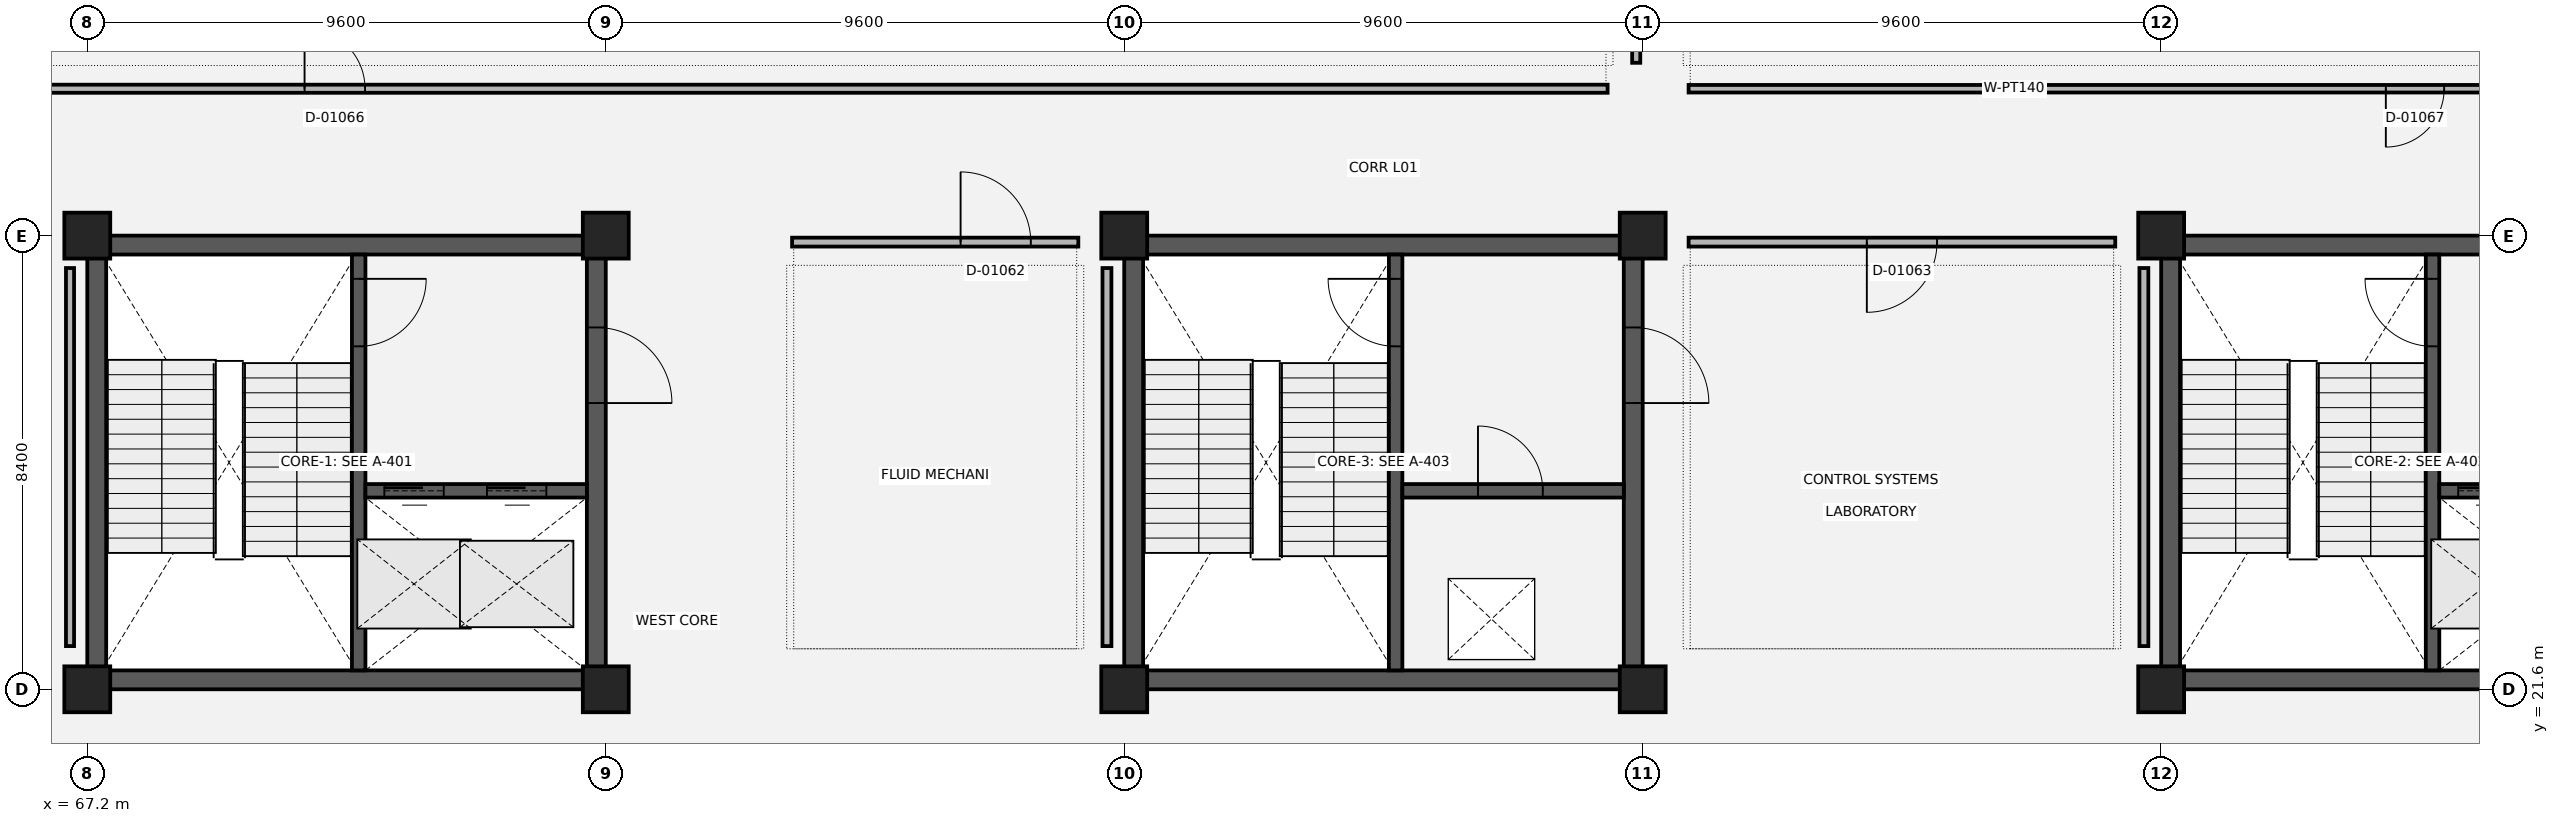
"""IFC4 building model, lengths in metres.
Left out: names, types, materials, properties, quantities, classifications, styles, units other than length and angle.
Written with IfcOpenShell. Run it as: python <this file> out.ifc"""

import sys

from ifc_helpers import new_model, si_unit, direction, frame, frame_2d, origin, origin_2d, place, context, subcontext, project, spatial, rectangle, extrude, element, fill, save


model = new_model("IFC4")
c1 = context("Model", 3, precision=1e-05, world=origin(), true_north=direction((0.0, 1.0)))
c2 = subcontext(c1, "Body", "Model", "MODEL_VIEW")
j1 = project(units=[si_unit("LENGTHUNIT", "METRE"), si_unit("PLANEANGLEUNIT", "RADIAN")], contexts=[c1])
p1 = place(None, origin())
s1 = spatial("IfcSite", under=j1, at=p1, CompositionType="ELEMENT")
p2 = place(p1, origin())
s2 = spatial("IfcBuilding", under=s1, at=p2, CompositionType="ELEMENT")
p3 = place(p2, frame((0.0, 0.0, 5.4)))
s3 = spatial("IfcBuildingStorey", under=s2, at=p3, CompositionType="ELEMENT", Elevation=5.4)
for number, where, z_axis, x_axis in (
    (1, (67.2, 21.6, 0.0), (0.0, 0.0, 1.0), (1.0, 0.0, 0.0)),
    (2, (67.2, 30.0, 0.0), (0.0, 0.0, 1.0), (1.0, 0.0, 0.0)),
    (3, (76.8, 21.6, 0.0), (0.0, 0.0, 1.0), (1.0, 0.0, 0.0)),
    (4, (76.8, 30.0, 0.0), (0.0, 0.0, 1.0), (1.0, 0.0, 0.0)),
    (5, (86.4, 21.6, 0.0), (0.0, 0.0, 1.0), (1.0, 0.0, 0.0)),
    (6, (86.4, 30.0, 0.0), (0.0, 0.0, 1.0), (1.0, 0.0, 0.0)),
    (7, (96.0, 21.6, 0.0), (0.0, 0.0, 1.0), (1.0, 0.0, 0.0)),
    (8, (96.0, 30.0, 0.0), (0.0, 0.0, 1.0), (1.0, 0.0, 0.0)),
    (9, (105.6, 21.6, 0.0), (0.0, 0.0, 1.0), (1.0, 0.0, 0.0)),
    (10, (105.6, 30.0, 0.0), (0.0, 0.0, 1.0), (1.0, 0.0, 0.0)),
):
    element("IfcColumn", number, at=place(p3, frame(where, z_axis=z_axis, x_axis=x_axis)), inside=s3, PredefinedType="COLUMN", context=c2, shape_type="SweptSolid", body=[
        extrude(rectangle(XDim=0.85, YDim=0.85, at=origin_2d()), origin(), (0.0, 0.0, 1.0), 4.8),
    ])
for number, where, z_axis, x_axis in (
    (11, (67.2, 29.825, 0.0), (0.0, 0.0, 1.0), (1.0, 0.0, 0.0)),
    (12, (67.2, 21.775, 0.0), (0.0, 0.0, 1.0), (1.0, 0.0, 0.0)),
):
    element("IfcWall", number, at=place(p3, frame(where, z_axis=z_axis, x_axis=x_axis)), inside=s3, PredefinedType="SHEAR", context=c2, shape_type="SweptSolid", body=[
        extrude(rectangle(XDim=9.6, YDim=0.35, at=frame_2d((4.8, 0.0))), origin(), (0.0, 0.0, 1.0), 4.48),
    ])
p4 = place(p3, frame((67.375, 21.6, 0.0), z_axis=(0.0, 0.0, 1.0), x_axis=(0.0, 1.0, 0.0)))
e13 = element("IfcWall", 13, at=p4, inside=s3, PredefinedType="SHEAR", context=c2, shape_type="SweptSolid", body=[
    extrude(rectangle(XDim=8.4, YDim=0.35, at=frame_2d((4.2, 0.0))), origin(), (0.0, 0.0, 1.0), 4.48),
])
p5 = place(p3, frame((76.625, 21.6, 0.0), z_axis=(0.0, 0.0, 1.0), x_axis=(0.0, 1.0, 0.0)))
e14 = element("IfcWall", 14, at=p5, inside=s3, PredefinedType="SHEAR", context=c2, shape_type="SweptSolid", body=[
    extrude(rectangle(XDim=8.4, YDim=0.35, at=frame_2d((4.2, 0.0))), origin(), (0.0, 0.0, 1.0), 4.48),
])
p6 = place(p5, frame((5.3, 0.0, 0.0)))
e15 = element("IfcOpeningElement", 15, at=p6, cuts=e14, PredefinedType="OPENING", context=c2, shape_type="SweptSolid", body=[
    extrude(rectangle(XDim=1.4, YDim=2.15, at=frame_2d((0.7, 1.075))), frame((0.0, 0.185, 0.0), z_axis=(0.0, -1.0, 0.0), x_axis=(1.0, 0.0, 0.0)), (0.0, 0.0, 1.0), 0.37),
])
p7 = place(p3, frame((72.225, 29.65, 0.0), z_axis=(0.0, 0.0, 1.0), x_axis=(0.0, -1.0, 0.0)))
e16 = element("IfcWall", 16, at=p7, inside=s3, PredefinedType="SHEAR", context=c2, shape_type="SweptSolid", body=[
    extrude(rectangle(XDim=7.7, YDim=0.25, at=frame_2d((3.85, 0.0))), origin(), (0.0, 0.0, 1.0), 4.48),
])
p8 = place(p7, frame((0.45, 0.0, 0.0)))
e17 = element("IfcOpeningElement", 17, at=p8, cuts=e16, PredefinedType="OPENING", context=c2, shape_type="SweptSolid", body=[
    extrude(rectangle(XDim=1.25, YDim=2.15, at=frame_2d((0.625, 1.075))), frame((0.0, 0.135, 0.0), z_axis=(0.0, -1.0, 0.0), x_axis=(1.0, 0.0, 0.0)), (0.0, 0.0, 1.0), 0.27),
])
p9 = place(p3, frame((72.35, 25.275, 0.0), z_axis=(0.0, 0.0, 1.0), x_axis=(1.0, 0.0, 0.0)))
e18 = element("IfcWall", 18, at=p9, inside=s3, PredefinedType="SHEAR", context=c2, shape_type="SweptSolid", body=[
    extrude(rectangle(XDim=4.1, YDim=0.25, at=frame_2d((2.05, 0.0))), origin(), (0.0, 0.0, 1.0), 4.48),
])
p10 = place(p9, frame((0.35, 0.0, 0.0)))
e19 = element("IfcOpeningElement", 19, at=p10, cuts=e18, PredefinedType="OPENING", context=c2, shape_type="SweptSolid", body=[
    extrude(rectangle(XDim=1.1, YDim=2.15, at=frame_2d((0.55, 1.075))), frame((0.0, 0.135, 0.0), z_axis=(0.0, -1.0, 0.0), x_axis=(1.0, 0.0, 0.0)), (0.0, 0.0, 1.0), 0.27),
])
p11 = place(p9, frame((2.25, 0.0, 0.0)))
e20 = element("IfcOpeningElement", 20, at=p11, cuts=e18, PredefinedType="OPENING", context=c2, shape_type="SweptSolid", body=[
    extrude(rectangle(XDim=1.1, YDim=2.15, at=frame_2d((0.55, 1.075))), frame((0.0, 0.135, 0.0), z_axis=(0.0, -1.0, 0.0), x_axis=(1.0, 0.0, 0.0)), (0.0, 0.0, 1.0), 0.27),
])
for number, where, z_axis, x_axis in (
    (21, (105.6, 29.825, 0.0), (0.0, 0.0, 1.0), (1.0, 0.0, 0.0)),
    (22, (105.6, 21.775, 0.0), (0.0, 0.0, 1.0), (1.0, 0.0, 0.0)),
):
    element("IfcWall", number, at=place(p3, frame(where, z_axis=z_axis, x_axis=x_axis)), inside=s3, PredefinedType="SHEAR", context=c2, shape_type="SweptSolid", body=[
        extrude(rectangle(XDim=9.6, YDim=0.35, at=frame_2d((4.8, 0.0))), origin(), (0.0, 0.0, 1.0), 4.48),
    ])
p12 = place(p3, frame((105.775, 21.6, 0.0), z_axis=(0.0, 0.0, 1.0), x_axis=(0.0, 1.0, 0.0)))
e23 = element("IfcWall", 23, at=p12, inside=s3, PredefinedType="SHEAR", context=c2, shape_type="SweptSolid", body=[
    extrude(rectangle(XDim=8.4, YDim=0.35, at=frame_2d((4.2, 0.0))), origin(), (0.0, 0.0, 1.0), 4.48),
])
p13 = place(p3, frame((110.625, 29.65, 0.0), z_axis=(0.0, 0.0, 1.0), x_axis=(0.0, -1.0, 0.0)))
e24 = element("IfcWall", 24, at=p13, inside=s3, PredefinedType="SHEAR", context=c2, shape_type="SweptSolid", body=[
    extrude(rectangle(XDim=7.7, YDim=0.25, at=frame_2d((3.85, 0.0))), origin(), (0.0, 0.0, 1.0), 4.48),
])
p14 = place(p13, frame((0.45, 0.0, 0.0)))
e25 = element("IfcOpeningElement", 25, at=p14, cuts=e24, PredefinedType="OPENING", context=c2, shape_type="SweptSolid", body=[
    extrude(rectangle(XDim=1.25, YDim=2.15, at=frame_2d((0.625, 1.075))), frame((0.0, 0.135, 0.0), z_axis=(0.0, -1.0, 0.0), x_axis=(1.0, 0.0, 0.0)), (0.0, 0.0, 1.0), 0.27),
])
p15 = place(p3, frame((110.75, 25.275, 0.0), z_axis=(0.0, 0.0, 1.0), x_axis=(1.0, 0.0, 0.0)))
e26 = element("IfcWall", 26, at=p15, inside=s3, PredefinedType="SHEAR", context=c2, shape_type="SweptSolid", body=[
    extrude(rectangle(XDim=4.1, YDim=0.25, at=frame_2d((2.05, 0.0))), origin(), (0.0, 0.0, 1.0), 4.48),
])
p16 = place(p15, frame((0.35, 0.0, 0.0)))
e27 = element("IfcOpeningElement", 27, at=p16, cuts=e26, PredefinedType="OPENING", context=c2, shape_type="SweptSolid", body=[
    extrude(rectangle(XDim=1.1, YDim=2.15, at=frame_2d((0.55, 1.075))), frame((0.0, 0.135, 0.0), z_axis=(0.0, -1.0, 0.0), x_axis=(1.0, 0.0, 0.0)), (0.0, 0.0, 1.0), 0.27),
])
p17 = place(p15, frame((2.25, 0.0, 0.0)))
e28 = element("IfcOpeningElement", 28, at=p17, cuts=e26, PredefinedType="OPENING", context=c2, shape_type="SweptSolid", body=[
    extrude(rectangle(XDim=1.1, YDim=2.15, at=frame_2d((0.55, 1.075))), frame((0.0, 0.135, 0.0), z_axis=(0.0, -1.0, 0.0), x_axis=(1.0, 0.0, 0.0)), (0.0, 0.0, 1.0), 0.27),
])
for number, where, z_axis, x_axis in (
    (29, (86.4, 29.825, 0.0), (0.0, 0.0, 1.0), (1.0, 0.0, 0.0)),
    (30, (86.4, 21.775, 0.0), (0.0, 0.0, 1.0), (1.0, 0.0, 0.0)),
):
    element("IfcWall", number, at=place(p3, frame(where, z_axis=z_axis, x_axis=x_axis)), inside=s3, PredefinedType="SHEAR", context=c2, shape_type="SweptSolid", body=[
        extrude(rectangle(XDim=9.6, YDim=0.35, at=frame_2d((4.8, 0.0))), origin(), (0.0, 0.0, 1.0), 4.48),
    ])
p18 = place(p3, frame((86.575, 21.6, 0.0), z_axis=(0.0, 0.0, 1.0), x_axis=(0.0, 1.0, 0.0)))
e31 = element("IfcWall", 31, at=p18, inside=s3, PredefinedType="SHEAR", context=c2, shape_type="SweptSolid", body=[
    extrude(rectangle(XDim=8.4, YDim=0.35, at=frame_2d((4.2, 0.0))), origin(), (0.0, 0.0, 1.0), 4.48),
])
p19 = place(p3, frame((95.825, 21.6, 0.0), z_axis=(0.0, 0.0, 1.0), x_axis=(0.0, 1.0, 0.0)))
e32 = element("IfcWall", 32, at=p19, inside=s3, PredefinedType="SHEAR", context=c2, shape_type="SweptSolid", body=[
    extrude(rectangle(XDim=8.4, YDim=0.35, at=frame_2d((4.2, 0.0))), origin(), (0.0, 0.0, 1.0), 4.48),
])
p20 = place(p19, frame((5.3, 0.0, 0.0)))
e33 = element("IfcOpeningElement", 33, at=p20, cuts=e32, PredefinedType="OPENING", context=c2, shape_type="SweptSolid", body=[
    extrude(rectangle(XDim=1.4, YDim=2.15, at=frame_2d((0.7, 1.075))), frame((0.0, 0.185, 0.0), z_axis=(0.0, -1.0, 0.0), x_axis=(1.0, 0.0, 0.0)), (0.0, 0.0, 1.0), 0.37),
])
p21 = place(p3, frame((91.425, 29.65, 0.0), z_axis=(0.0, 0.0, 1.0), x_axis=(0.0, -1.0, 0.0)))
e34 = element("IfcWall", 34, at=p21, inside=s3, PredefinedType="SHEAR", context=c2, shape_type="SweptSolid", body=[
    extrude(rectangle(XDim=7.7, YDim=0.25, at=frame_2d((3.85, 0.0))), origin(), (0.0, 0.0, 1.0), 4.48),
])
p22 = place(p21, frame((0.45, 0.0, 0.0)))
e35 = element("IfcOpeningElement", 35, at=p22, cuts=e34, PredefinedType="OPENING", context=c2, shape_type="SweptSolid", body=[
    extrude(rectangle(XDim=1.25, YDim=2.15, at=frame_2d((0.625, 1.075))), frame((0.0, 0.135, 0.0), z_axis=(0.0, -1.0, 0.0), x_axis=(1.0, 0.0, 0.0)), (0.0, 0.0, 1.0), 0.27),
])
p23 = place(p3, frame((91.55, 25.275, 0.0), z_axis=(0.0, 0.0, 1.0), x_axis=(1.0, 0.0, 0.0)))
e36 = element("IfcWall", 36, at=p23, inside=s3, PredefinedType="SHEAR", context=c2, shape_type="SweptSolid", body=[
    extrude(rectangle(XDim=4.1, YDim=0.25, at=frame_2d((2.05, 0.0))), origin(), (0.0, 0.0, 1.0), 4.48),
])
p24 = place(p23, frame((1.4, 0.0, 0.0)))
e37 = element("IfcOpeningElement", 37, at=p24, cuts=e36, PredefinedType="OPENING", context=c2, shape_type="SweptSolid", body=[
    extrude(rectangle(XDim=1.2, YDim=2.15, at=frame_2d((0.6, 1.075))), frame((0.0, 0.135, 0.0), z_axis=(0.0, -1.0, 0.0), x_axis=(1.0, 0.0, 0.0)), (0.0, 0.0, 1.0), 0.27),
])
p25 = place(p3, frame((66.88, 22.4, 0.0), z_axis=(0.0, 0.0, 1.0), x_axis=(0.0, 1.0, 0.0)))
e38 = element("IfcWall", 38, at=p25, inside=s3, PredefinedType="PARTITIONING", context=c2, shape_type="SweptSolid", body=[
    extrude(rectangle(XDim=7.0, YDim=0.15, at=frame_2d((3.5, 0.0))), origin(), (0.0, 0.0, 1.0), 3.26),
])
p26 = place(p3, frame((80.25, 29.88, 0.0), z_axis=(0.0, 0.0, 1.0), x_axis=(1.0, 0.0, 0.0)))
e39 = element("IfcWall", 39, at=p26, inside=s3, PredefinedType="PARTITIONING", context=c2, shape_type="SweptSolid", body=[
    extrude(rectangle(XDim=5.3, YDim=0.165, at=frame_2d((2.65, 0.0))), origin(), (0.0, 0.0, 1.0), 3.26),
])
p27 = place(p26, frame((3.12, 0.0, 0.0)))
e40 = element("IfcOpeningElement", 40, at=p27, cuts=e39, PredefinedType="OPENING", context=c2, shape_type="SweptSolid", body=[
    extrude(rectangle(XDim=1.3, YDim=2.15, at=frame_2d((0.65, 1.075))), frame((0.0, 0.093, 0.0), z_axis=(0.0, -1.0, 0.0), x_axis=(1.0, 0.0, 0.0)), (0.0, 0.0, 1.0), 0.185),
])
p28 = place(p3, frame((86.08, 22.4, 0.0), z_axis=(0.0, 0.0, 1.0), x_axis=(0.0, 1.0, 0.0)))
e41 = element("IfcWall", 41, at=p28, inside=s3, PredefinedType="PARTITIONING", context=c2, shape_type="SweptSolid", body=[
    extrude(rectangle(XDim=7.0, YDim=0.165, at=frame_2d((3.5, 0.0))), origin(), (0.0, 0.0, 1.0), 3.26),
])
p29 = place(p3, frame((96.85, 29.88, 0.0), z_axis=(0.0, 0.0, 1.0), x_axis=(1.0, 0.0, 0.0)))
e42 = element("IfcWall", 42, at=p29, inside=s3, PredefinedType="PARTITIONING", context=c2, shape_type="SweptSolid", body=[
    extrude(rectangle(XDim=7.9, YDim=0.165, at=frame_2d((3.95, 0.0))), origin(), (0.0, 0.0, 1.0), 3.26),
])
p30 = place(p29, frame((3.3, 0.0, 0.0)))
e43 = element("IfcOpeningElement", 43, at=p30, cuts=e42, PredefinedType="OPENING", context=c2, shape_type="SweptSolid", body=[
    extrude(rectangle(XDim=1.3, YDim=2.15, at=frame_2d((0.65, 1.075))), frame((0.0, 0.093, 0.0), z_axis=(0.0, -1.0, 0.0), x_axis=(1.0, 0.0, 0.0)), (0.0, 0.0, 1.0), 0.185),
])
p31 = place(p3, frame((105.28, 22.4, 0.0), z_axis=(0.0, 0.0, 1.0), x_axis=(0.0, 1.0, 0.0)))
e44 = element("IfcWall", 44, at=p31, inside=s3, PredefinedType="PARTITIONING", context=c2, shape_type="SweptSolid", body=[
    extrude(rectangle(XDim=7.0, YDim=0.165, at=frame_2d((3.5, 0.0))), origin(), (0.0, 0.0, 1.0), 3.26),
])
p32 = place(p3, frame((58.65, 32.72, 0.0), z_axis=(0.0, 0.0, 1.0), x_axis=(1.0, 0.0, 0.0)))
e45 = element("IfcWall", 45, at=p32, inside=s3, PredefinedType="PARTITIONING", context=c2, shape_type="SweptSolid", body=[
    extrude(rectangle(XDim=36.7, YDim=0.15, at=frame_2d((18.35, 0.0))), origin(), (0.0, 0.0, 1.0), 3.26),
])
p33 = place(p32, frame((12.573, 0.0, 0.0)))
e46 = element("IfcOpeningElement", 46, at=p33, cuts=e45, PredefinedType="OPENING", context=c2, shape_type="SweptSolid", body=[
    extrude(rectangle(XDim=1.12, YDim=2.15, at=frame_2d((0.56, 1.075))), frame((0.0, 0.085, 0.0), z_axis=(0.0, -1.0, 0.0), x_axis=(1.0, 0.0, 0.0)), (0.0, 0.0, 1.0), 0.17),
])
p34 = place(p3, frame((95.88, 33.2, 0.0), z_axis=(0.0, 0.0, 1.0), x_axis=(0.0, 1.0, 0.0)))
e47 = element("IfcWall", 47, at=p34, inside=s3, PredefinedType="PARTITIONING", context=c2, shape_type="SweptSolid", body=[
    extrude(rectangle(XDim=9.0, YDim=0.15, at=frame_2d((4.5, 0.0))), origin(), (0.0, 0.0, 1.0), 3.26),
])
p35 = place(p3, frame((96.85, 32.72, 0.0), z_axis=(0.0, 0.0, 1.0), x_axis=(1.0, 0.0, 0.0)))
e48 = element("IfcWall", 48, at=p35, inside=s3, PredefinedType="PARTITIONING", context=c2, shape_type="SweptSolid", body=[
    extrude(rectangle(XDim=26.9, YDim=0.14, at=frame_2d((13.45, 0.0))), origin(), (0.0, 0.0, 1.0), 3.26),
])
p36 = place(p35, frame((12.91, 0.0, 0.0)))
e49 = element("IfcOpeningElement", 49, at=p36, cuts=e48, PredefinedType="OPENING", context=c2, shape_type="SweptSolid", body=[
    extrude(rectangle(XDim=1.08, YDim=2.15, at=frame_2d((0.54, 1.075))), frame((0.0, 0.08, 0.0), z_axis=(0.0, -1.0, 0.0), x_axis=(1.0, 0.0, 0.0)), (0.0, 0.0, 1.0), 0.16),
])
p37 = place(p8, origin())
e50 = element("IfcDoor", 50, at=p37, inside=s3, OperationType="SINGLE_SWING_LEFT", PredefinedType="DOOR", context=c2, shape_type="SweptSolid", body=[
    extrude(rectangle(XDim=1.25, YDim=2.15, at=frame_2d((0.625, 1.075))), frame((0.0, 0.025, 0.0), z_axis=(0.0, -1.0, 0.0), x_axis=(1.0, 0.0, 0.0)), (0.0, 0.0, 1.0), 0.05),
])
fill(e17, e50)
p38 = place(p10, origin())
e51 = element("IfcDoor", 51, at=p38, inside=s3, OperationType="SLIDING_TO_LEFT", PredefinedType="DOOR", context=c2, shape_type="SweptSolid", body=[
    extrude(rectangle(XDim=1.1, YDim=2.15, at=frame_2d((0.55, 1.075))), frame((0.0, 0.025, 0.0), z_axis=(0.0, -1.0, 0.0), x_axis=(1.0, 0.0, 0.0)), (0.0, 0.0, 1.0), 0.05),
])
fill(e19, e51)
p39 = place(p11, origin())
e52 = element("IfcDoor", 52, at=p39, inside=s3, OperationType="SLIDING_TO_LEFT", PredefinedType="DOOR", context=c2, shape_type="SweptSolid", body=[
    extrude(rectangle(XDim=1.1, YDim=2.15, at=frame_2d((0.55, 1.075))), frame((0.0, 0.025, 0.0), z_axis=(0.0, -1.0, 0.0), x_axis=(1.0, 0.0, 0.0)), (0.0, 0.0, 1.0), 0.05),
])
fill(e20, e52)
p40 = place(p6, origin())
e53 = element("IfcDoor", 53, at=p40, inside=s3, OperationType="SINGLE_SWING_RIGHT", PredefinedType="DOOR", context=c2, shape_type="SweptSolid", body=[
    extrude(rectangle(XDim=1.4, YDim=2.15, at=frame_2d((0.7, 1.075))), frame((0.0, 0.025, 0.0), z_axis=(0.0, -1.0, 0.0), x_axis=(1.0, 0.0, 0.0)), (0.0, 0.0, 1.0), 0.05),
])
fill(e15, e53)
p41 = place(p14, origin())
e54 = element("IfcDoor", 54, at=p41, inside=s3, OperationType="SINGLE_SWING_RIGHT", PredefinedType="DOOR", context=c2, shape_type="SweptSolid", body=[
    extrude(rectangle(XDim=1.25, YDim=2.15, at=frame_2d((0.625, 1.075))), frame((0.0, 0.025, 0.0), z_axis=(0.0, -1.0, 0.0), x_axis=(1.0, 0.0, 0.0)), (0.0, 0.0, 1.0), 0.05),
])
fill(e25, e54)
p42 = place(p16, origin())
e55 = element("IfcDoor", 55, at=p42, inside=s3, OperationType="SLIDING_TO_LEFT", PredefinedType="DOOR", context=c2, shape_type="SweptSolid", body=[
    extrude(rectangle(XDim=1.1, YDim=2.15, at=frame_2d((0.55, 1.075))), frame((0.0, 0.025, 0.0), z_axis=(0.0, -1.0, 0.0), x_axis=(1.0, 0.0, 0.0)), (0.0, 0.0, 1.0), 0.05),
])
fill(e27, e55)
p43 = place(p22, origin())
e56 = element("IfcDoor", 56, at=p43, inside=s3, OperationType="SINGLE_SWING_RIGHT", PredefinedType="DOOR", context=c2, shape_type="SweptSolid", body=[
    extrude(rectangle(XDim=1.25, YDim=2.15, at=frame_2d((0.625, 1.075))), frame((0.0, 0.025, 0.0), z_axis=(0.0, -1.0, 0.0), x_axis=(1.0, 0.0, 0.0)), (0.0, 0.0, 1.0), 0.05),
])
fill(e35, e56)
p44 = place(p24, origin())
e57 = element("IfcDoor", 57, at=p44, inside=s3, OperationType="SINGLE_SWING_LEFT", PredefinedType="DOOR", context=c2, shape_type="SweptSolid", body=[
    extrude(rectangle(XDim=1.2, YDim=2.15, at=frame_2d((0.6, 1.075))), frame((0.0, 0.025, 0.0), z_axis=(0.0, -1.0, 0.0), x_axis=(1.0, 0.0, 0.0)), (0.0, 0.0, 1.0), 0.05),
])
fill(e37, e57)
p45 = place(p20, origin())
e58 = element("IfcDoor", 58, at=p45, inside=s3, OperationType="SINGLE_SWING_RIGHT", PredefinedType="DOOR", context=c2, shape_type="SweptSolid", body=[
    extrude(rectangle(XDim=1.4, YDim=2.15, at=frame_2d((0.7, 1.075))), frame((0.0, 0.025, 0.0), z_axis=(0.0, -1.0, 0.0), x_axis=(1.0, 0.0, 0.0)), (0.0, 0.0, 1.0), 0.05),
])
fill(e33, e58)
p46 = place(p27, origin())
e59 = element("IfcDoor", 59, at=p46, inside=s3, OperationType="SINGLE_SWING_LEFT", PredefinedType="DOOR", context=c2, shape_type="SweptSolid", body=[
    extrude(rectangle(XDim=1.3, YDim=2.15, at=frame_2d((0.65, 1.075))), frame((0.0, 0.025, 0.0), z_axis=(0.0, -1.0, 0.0), x_axis=(1.0, 0.0, 0.0)), (0.0, 0.0, 1.0), 0.05),
])
fill(e40, e59)
p47 = place(p30, origin())
e60 = element("IfcDoor", 60, at=p47, inside=s3, OperationType="SINGLE_SWING_RIGHT", PredefinedType="DOOR", context=c2, shape_type="SweptSolid", body=[
    extrude(rectangle(XDim=1.3, YDim=2.15, at=frame_2d((0.65, 1.075))), frame((0.0, 0.025, 0.0), z_axis=(0.0, -1.0, 0.0), x_axis=(1.0, 0.0, 0.0)), (0.0, 0.0, 1.0), 0.05),
])
fill(e43, e60)
p48 = place(p33, origin())
e61 = element("IfcDoor", 61, at=p48, inside=s3, OperationType="SINGLE_SWING_LEFT", PredefinedType="DOOR", context=c2, shape_type="SweptSolid", body=[
    extrude(rectangle(XDim=1.12, YDim=2.15, at=frame_2d((0.56, 1.075))), frame((0.0, 0.025, 0.0), z_axis=(0.0, -1.0, 0.0), x_axis=(1.0, 0.0, 0.0)), (0.0, 0.0, 1.0), 0.05),
])
fill(e46, e61)
p49 = place(p36, origin())
e62 = element("IfcDoor", 62, at=p49, inside=s3, OperationType="SINGLE_SWING_RIGHT", PredefinedType="DOOR", context=c2, shape_type="SweptSolid", body=[
    extrude(rectangle(XDim=1.08, YDim=2.15, at=frame_2d((0.54, 1.075))), frame((0.0, 0.025, 0.0), z_axis=(0.0, -1.0, 0.0), x_axis=(1.0, 0.0, 0.0)), (0.0, 0.0, 1.0), 0.05),
])
fill(e49, e62)
save(model, sys.argv[1])
